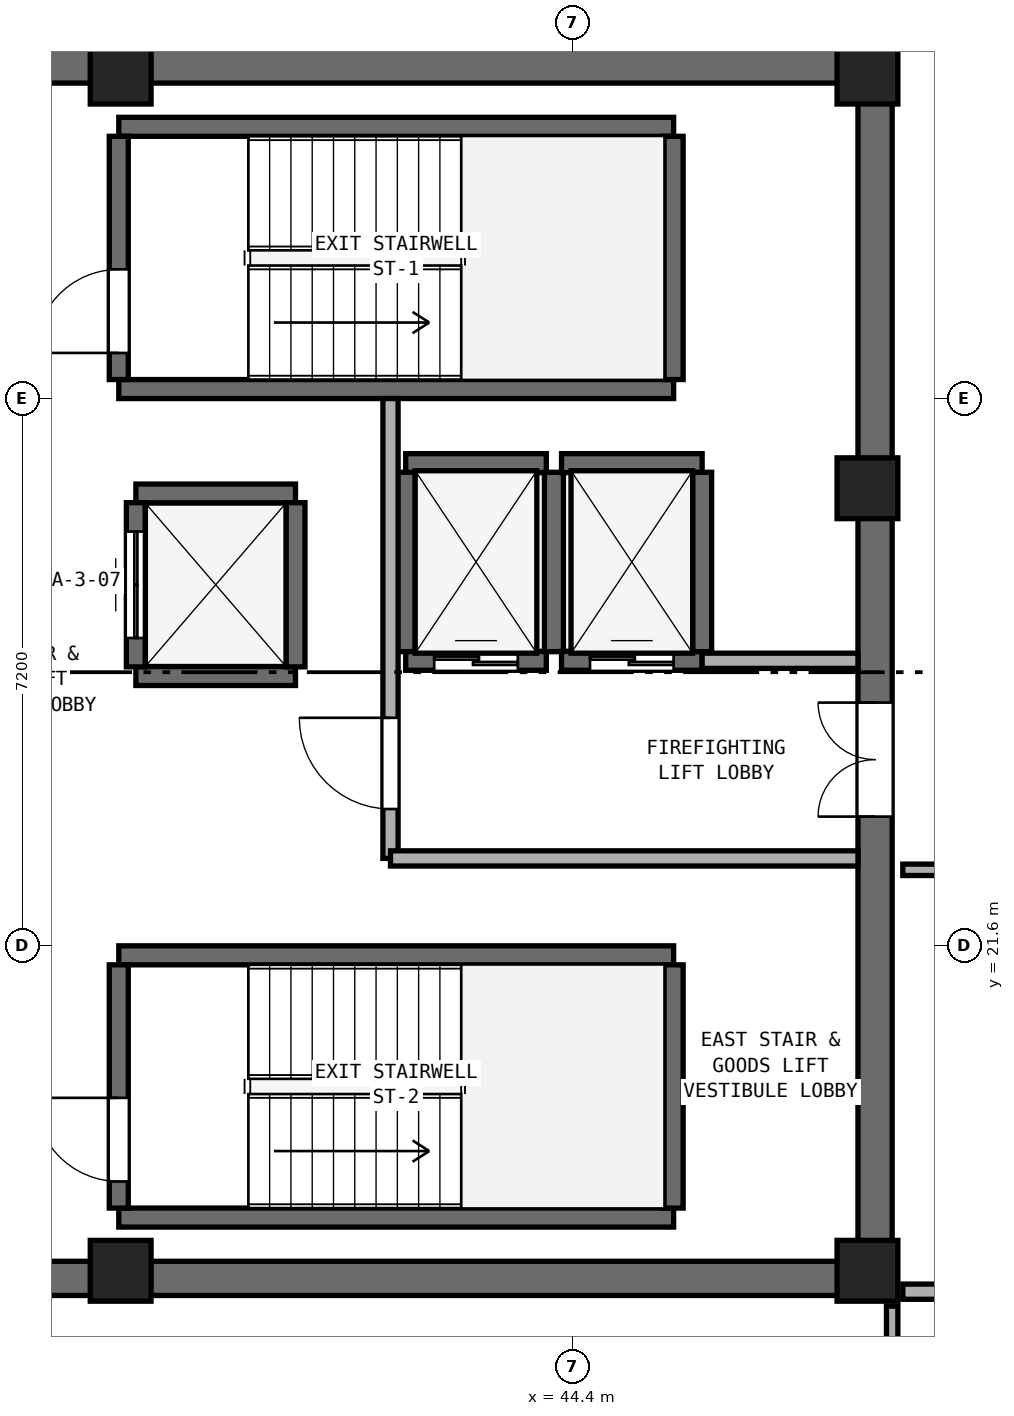
"""IFC4 building model, lengths in metres.
Left out: names, types, materials, properties, quantities, classifications, styles, units other than length and angle.
Written with IfcOpenShell. Run it as: python <this file> out.ifc"""

import sys

from ifc_helpers import new_model, si_unit, direction, frame, frame_2d, origin, origin_2d, place, context, subcontext, project, spatial, rectangle, extrude, element, fill, save


model = new_model("IFC4")
c1 = context("Model", 3, precision=1e-05, world=origin(), true_north=direction((0.0, 1.0)))
c2 = subcontext(c1, "Body", "Model", "MODEL_VIEW")
j1 = project(units=[si_unit("LENGTHUNIT", "METRE"), si_unit("PLANEANGLEUNIT", "RADIAN")], contexts=[c1])
p1 = place(None, origin())
s1 = spatial("IfcSite", under=j1, at=p1, CompositionType="ELEMENT")
p2 = place(p1, origin())
s2 = spatial("IfcBuilding", under=s1, at=p2, CompositionType="ELEMENT")
p3 = place(p2, frame((0.0, 0.0, 255.4)))
s3 = spatial("IfcBuildingStorey", under=s2, at=p3, CompositionType="ELEMENT", Elevation=255.4)
for number, where, z_axis, x_axis in (
    (1, (25.4, 17.225, 0.0), (0.0, 0.0, 1.0), (1.0, 0.0, 0.0)),
    (2, (25.4, 33.175, 0.0), (0.0, 0.0, 1.0), (1.0, 0.0, 0.0)),
):
    element("IfcWall", number, at=place(p3, frame(where, z_axis=z_axis, x_axis=x_axis)), inside=s3, PredefinedType="SHEAR", context=c2, shape_type="SweptSolid", body=[
        extrude(rectangle(XDim=23.2, YDim=0.45, at=frame_2d((11.6, 0.0))), origin(), (0.0, 0.0, 1.0), 3.51),
    ])
p4 = place(p3, frame((48.375, 17.45, 0.0), z_axis=(0.0, 0.0, 1.0), x_axis=(0.0, 1.0, 0.0)))
e3 = element("IfcWall", 3, at=p4, inside=s3, PredefinedType="SHEAR", context=c2, shape_type="SweptSolid", body=[
    extrude(rectangle(XDim=15.5, YDim=0.45, at=frame_2d((7.75, 0.0))), origin(), (0.0, 0.0, 1.0), 3.51),
])
p5 = place(p4, frame((5.85, 0.0, 0.0)))
e4 = element("IfcOpeningElement", 4, at=p5, cuts=e3, PredefinedType="OPENING", context=c2, shape_type="SweptSolid", body=[
    extrude(rectangle(XDim=1.5, YDim=2.15, at=frame_2d((0.75, 1.075))), frame((0.0, 0.235, 0.0), z_axis=(0.0, -1.0, 0.0), x_axis=(1.0, 0.0, 0.0)), (0.0, 0.0, 1.0), 0.47),
])
for number, where, z_axis, x_axis in (
    (5, (38.45, 17.325, 0.0), (0.0, 0.0, 1.0), (1.0, 0.0, 0.0)),
    (6, (48.275, 17.325, 0.0), (0.0, 0.0, 1.0), (1.0, 0.0, 0.0)),
    (7, (48.275, 27.62, 0.0), (0.0, 0.0, 1.0), (1.0, 0.0, 0.0)),
    (8, (48.275, 33.075, 0.0), (0.0, 0.0, 1.0), (1.0, 0.0, 0.0)),
    (9, (38.45, 33.075, 0.0), (0.0, 0.0, 1.0), (1.0, 0.0, 0.0)),
):
    element("IfcColumn", number, at=place(p3, frame(where, z_axis=z_axis, x_axis=x_axis)), inside=s3, PredefinedType="PILASTER", context=c2, shape_type="SweptSolid", body=[
        extrude(rectangle(XDim=0.8, YDim=0.8, at=origin_2d()), origin(), (0.0, 0.0, 1.0), 3.8),
    ])
for number, where, z_axis, x_axis in (
    (10, (38.425, 28.925, 0.0), (0.0, 0.0, 1.0), (1.0, 0.0, 0.0)),
    (11, (38.425, 32.375, 0.0), (0.0, 0.0, 1.0), (1.0, 0.0, 0.0)),
):
    element("IfcWall", number, at=place(p3, frame(where, z_axis=z_axis, x_axis=x_axis)), inside=s3, PredefinedType="SHEAR", context=c2, shape_type="SweptSolid", body=[
        extrude(rectangle(XDim=7.3, YDim=0.25, at=frame_2d((3.65, 0.0))), origin(), (0.0, 0.0, 1.0), 3.51),
    ])
p6 = place(p3, frame((38.425, 29.05, 0.0), z_axis=(0.0, 0.0, 1.0), x_axis=(0.0, 1.0, 0.0)))
e12 = element("IfcWall", 12, at=p6, inside=s3, PredefinedType="SHEAR", context=c2, shape_type="SweptSolid", body=[
    extrude(rectangle(XDim=3.2, YDim=0.25, at=frame_2d((1.6, 0.0))), origin(), (0.0, 0.0, 1.0), 3.51),
])
p7 = place(p6, frame((0.35, 0.0, 0.0)))
e13 = element("IfcOpeningElement", 13, at=p7, cuts=e12, PredefinedType="OPENING", context=c2, shape_type="SweptSolid", body=[
    extrude(rectangle(XDim=1.1, YDim=2.15, at=frame_2d((0.55, 1.075))), frame((0.0, 0.135, 0.0), z_axis=(0.0, -1.0, 0.0), x_axis=(1.0, 0.0, 0.0)), (0.0, 0.0, 1.0), 0.27),
])
p8 = place(p3, frame((45.725, 29.05, 0.0), z_axis=(0.0, 0.0, 1.0), x_axis=(0.0, 1.0, 0.0)))
e14 = element("IfcWall", 14, at=p8, inside=s3, PredefinedType="SHEAR", context=c2, shape_type="SweptSolid", body=[
    extrude(rectangle(XDim=3.2, YDim=0.25, at=frame_2d((1.6, 0.0))), origin(), (0.0, 0.0, 1.0), 3.51),
])
for number, where, z_axis, x_axis in (
    (15, (38.425, 18.025, 0.0), (0.0, 0.0, 1.0), (1.0, 0.0, 0.0)),
    (16, (38.425, 21.475, 0.0), (0.0, 0.0, 1.0), (1.0, 0.0, 0.0)),
):
    element("IfcWall", number, at=place(p3, frame(where, z_axis=z_axis, x_axis=x_axis)), inside=s3, PredefinedType="SHEAR", context=c2, shape_type="SweptSolid", body=[
        extrude(rectangle(XDim=7.3, YDim=0.25, at=frame_2d((3.65, 0.0))), origin(), (0.0, 0.0, 1.0), 3.51),
    ])
p9 = place(p3, frame((38.425, 18.15, 0.0), z_axis=(0.0, 0.0, 1.0), x_axis=(0.0, 1.0, 0.0)))
e17 = element("IfcWall", 17, at=p9, inside=s3, PredefinedType="SHEAR", context=c2, shape_type="SweptSolid", body=[
    extrude(rectangle(XDim=3.2, YDim=0.25, at=frame_2d((1.6, 0.0))), origin(), (0.0, 0.0, 1.0), 3.51),
])
p10 = place(p9, frame((0.35, 0.0, 0.0)))
e18 = element("IfcOpeningElement", 18, at=p10, cuts=e17, PredefinedType="OPENING", context=c2, shape_type="SweptSolid", body=[
    extrude(rectangle(XDim=1.1, YDim=2.15, at=frame_2d((0.55, 1.075))), frame((0.0, 0.135, 0.0), z_axis=(0.0, -1.0, 0.0), x_axis=(1.0, 0.0, 0.0)), (0.0, 0.0, 1.0), 0.27),
])
p11 = place(p3, frame((45.725, 18.15, 0.0), z_axis=(0.0, 0.0, 1.0), x_axis=(0.0, 1.0, 0.0)))
e19 = element("IfcWall", 19, at=p11, inside=s3, PredefinedType="SHEAR", context=c2, shape_type="SweptSolid", body=[
    extrude(rectangle(XDim=3.2, YDim=0.25, at=frame_2d((1.6, 0.0))), origin(), (0.0, 0.0, 1.0), 3.51),
])
p12 = place(p3, frame((42.2, 25.35, 0.0), z_axis=(0.0, 0.0, 1.0), x_axis=(1.0, 0.0, 0.0)))
e20 = element("IfcWall", 20, at=p12, inside=s3, PredefinedType="SHEAR", context=c2, shape_type="SweptSolid", body=[
    extrude(rectangle(XDim=1.85, YDim=0.25, at=frame_2d((0.925, 0.0))), origin(), (0.0, 0.0, 1.0), 3.51),
])
p13 = place(p12, frame((0.375, 0.0, 0.0)))
e21 = element("IfcOpeningElement", 21, at=p13, cuts=e20, PredefinedType="OPENING", context=c2, shape_type="SweptSolid", body=[
    extrude(rectangle(XDim=1.1, YDim=2.15, at=frame_2d((0.55, 1.075))), frame((0.0, 0.135, 0.0), z_axis=(0.0, -1.0, 0.0), x_axis=(1.0, 0.0, 0.0)), (0.0, 0.0, 1.0), 0.27),
])
p14 = place(p3, frame((42.2, 27.95, 0.0), z_axis=(0.0, 0.0, 1.0), x_axis=(1.0, 0.0, 0.0)))
e22 = element("IfcWall", 22, at=p14, inside=s3, PredefinedType="SHEAR", context=c2, shape_type="SweptSolid", body=[
    extrude(rectangle(XDim=1.85, YDim=0.25, at=frame_2d((0.925, 0.0))), origin(), (0.0, 0.0, 1.0), 3.51),
])
for number, where, z_axis, x_axis in (
    (23, (42.2, 25.47, 0.0), (0.0, 0.0, 1.0), (0.0, 1.0, 0.0)),
    (24, (44.15, 25.47, 0.0), (0.0, 0.0, 1.0), (0.0, 1.0, 0.0)),
):
    element("IfcWall", number, at=place(p3, frame(where, z_axis=z_axis, x_axis=x_axis)), inside=s3, PredefinedType="SHEAR", context=c2, shape_type="SweptSolid", body=[
        extrude(rectangle(XDim=2.36, YDim=0.25, at=frame_2d((1.18, 0.0))), origin(), (0.0, 0.0, 1.0), 3.51),
    ])
p15 = place(p3, frame((44.25, 25.35, 0.0), z_axis=(0.0, 0.0, 1.0), x_axis=(1.0, 0.0, 0.0)))
e25 = element("IfcWall", 25, at=p15, inside=s3, PredefinedType="SHEAR", context=c2, shape_type="SweptSolid", body=[
    extrude(rectangle(XDim=1.85, YDim=0.25, at=frame_2d((0.925, 0.0))), origin(), (0.0, 0.0, 1.0), 3.51),
])
p16 = place(p15, frame((0.375, 0.0, 0.0)))
e26 = element("IfcOpeningElement", 26, at=p16, cuts=e25, PredefinedType="OPENING", context=c2, shape_type="SweptSolid", body=[
    extrude(rectangle(XDim=1.1, YDim=2.15, at=frame_2d((0.55, 1.075))), frame((0.0, 0.135, 0.0), z_axis=(0.0, -1.0, 0.0), x_axis=(1.0, 0.0, 0.0)), (0.0, 0.0, 1.0), 0.27),
])
p17 = place(p3, frame((44.25, 27.95, 0.0), z_axis=(0.0, 0.0, 1.0), x_axis=(1.0, 0.0, 0.0)))
e27 = element("IfcWall", 27, at=p17, inside=s3, PredefinedType="SHEAR", context=c2, shape_type="SweptSolid", body=[
    extrude(rectangle(XDim=1.85, YDim=0.25, at=frame_2d((0.925, 0.0))), origin(), (0.0, 0.0, 1.0), 3.51),
])
p18 = place(p3, frame((46.1, 25.47, 0.0), z_axis=(0.0, 0.0, 1.0), x_axis=(0.0, 1.0, 0.0)))
e28 = element("IfcWall", 28, at=p18, inside=s3, PredefinedType="SHEAR", context=c2, shape_type="SweptSolid", body=[
    extrude(rectangle(XDim=2.36, YDim=0.25, at=frame_2d((1.18, 0.0))), origin(), (0.0, 0.0, 1.0), 3.51),
])
for number, where, z_axis, x_axis in (
    (29, (38.65, 25.15, 0.0), (0.0, 0.0, 1.0), (1.0, 0.0, 0.0)),
    (30, (38.65, 27.55, 0.0), (0.0, 0.0, 1.0), (1.0, 0.0, 0.0)),
):
    element("IfcWall", number, at=place(p3, frame(where, z_axis=z_axis, x_axis=x_axis)), inside=s3, PredefinedType="SHEAR", context=c2, shape_type="SweptSolid", body=[
        extrude(rectangle(XDim=2.1, YDim=0.25, at=frame_2d((1.05, 0.0))), origin(), (0.0, 0.0, 1.0), 3.51),
    ])
p19 = place(p3, frame((38.65, 25.27, 0.0), z_axis=(0.0, 0.0, 1.0), x_axis=(0.0, 1.0, 0.0)))
e31 = element("IfcWall", 31, at=p19, inside=s3, PredefinedType="SHEAR", context=c2, shape_type="SweptSolid", body=[
    extrude(rectangle(XDim=2.16, YDim=0.25, at=frame_2d((1.08, 0.0))), origin(), (0.0, 0.0, 1.0), 3.51),
])
p20 = place(p19, frame((0.38, 0.0, 0.0)))
e32 = element("IfcOpeningElement", 32, at=p20, cuts=e31, PredefinedType="OPENING", context=c2, shape_type="SweptSolid", body=[
    extrude(rectangle(XDim=1.4, YDim=2.2, at=frame_2d((0.7, 1.1))), frame((0.0, 0.135, 0.0), z_axis=(0.0, -1.0, 0.0), x_axis=(1.0, 0.0, 0.0)), (0.0, 0.0, 1.0), 0.27),
])
p21 = place(p3, frame((40.75, 25.27, 0.0), z_axis=(0.0, 0.0, 1.0), x_axis=(0.0, 1.0, 0.0)))
e33 = element("IfcWall", 33, at=p21, inside=s3, PredefinedType="SHEAR", context=c2, shape_type="SweptSolid", body=[
    extrude(rectangle(XDim=2.16, YDim=0.25, at=frame_2d((1.08, 0.0))), origin(), (0.0, 0.0, 1.0), 3.51),
])
p22 = place(p3, frame((42.0, 22.75, 0.0), z_axis=(0.0, 0.0, 1.0), x_axis=(0.0, 1.0, 0.0)))
e34 = element("IfcWall", 34, at=p22, inside=s3, PredefinedType="SOLIDWALL", context=c2, shape_type="SweptSolid", body=[
    extrude(rectangle(XDim=6.05, YDim=0.2, at=frame_2d((3.025, 0.0))), origin(), (0.0, 0.0, 1.0), 3.51),
])
p23 = place(p22, frame((0.65, 0.0, 0.0)))
e35 = element("IfcOpeningElement", 35, at=p23, cuts=e34, PredefinedType="OPENING", context=c2, shape_type="SweptSolid", body=[
    extrude(rectangle(XDim=1.2, YDim=2.15, at=frame_2d((0.6, 1.075))), frame((0.0, 0.11, 0.0), z_axis=(0.0, -1.0, 0.0), x_axis=(1.0, 0.0, 0.0)), (0.0, 0.0, 1.0), 0.22),
])
p24 = place(p3, frame((42.0, 22.75, 0.0), z_axis=(0.0, 0.0, 1.0), x_axis=(1.0, 0.0, 0.0)))
e36 = element("IfcWall", 36, at=p24, inside=s3, PredefinedType="SOLIDWALL", context=c2, shape_type="SweptSolid", body=[
    extrude(rectangle(XDim=6.15, YDim=0.2, at=frame_2d((3.075, 0.0))), origin(), (0.0, 0.0, 1.0), 3.51),
])
p25 = place(p3, frame((46.1, 25.35, 0.0), z_axis=(0.0, 0.0, 1.0), x_axis=(1.0, 0.0, 0.0)))
e37 = element("IfcWall", 37, at=p25, inside=s3, PredefinedType="SOLIDWALL", context=c2, shape_type="SweptSolid", body=[
    extrude(rectangle(XDim=2.05, YDim=0.2, at=frame_2d((1.025, 0.0))), origin(), (0.0, 0.0, 1.0), 3.51),
])
p26 = place(p3, frame((48.6, 15.2, 0.0), z_axis=(0.0, 0.0, 1.0), x_axis=(0.0, 1.0, 0.0)))
e38 = element("IfcWall", 38, at=p26, inside=s3, PredefinedType="PARTITIONING", context=c2, shape_type="SweptSolid", body=[
    extrude(rectangle(XDim=1.66, YDim=0.15, at=frame_2d((0.83, 0.0))), origin(), (0.0, 0.0, 1.0), 2.893),
])
p27 = place(p3, frame((48.74, 17.05, 0.0), z_axis=(0.0, 0.0, 1.0), x_axis=(1.0, 0.0, 0.0)))
e39 = element("IfcWall", 39, at=p27, inside=s3, PredefinedType="PARTITIONING", context=c2, shape_type="SweptSolid", body=[
    extrude(rectangle(XDim=16.555, YDim=0.2, at=frame_2d((8.277, 0.0))), origin(), (0.0, 0.0, 1.0), 2.893),
])
p28 = place(p3, frame((48.74, 22.6, 0.0), z_axis=(0.0, 0.0, 1.0), x_axis=(1.0, 0.0, 0.0)))
e40 = element("IfcWall", 40, at=p28, inside=s3, PredefinedType="PARTITIONING", context=c2, shape_type="SweptSolid", body=[
    extrude(rectangle(XDim=1.66, YDim=0.15, at=frame_2d((0.83, 0.0))), origin(), (0.0, 0.0, 1.0), 3.51),
])
p29 = place(p7, origin())
e41 = element("IfcDoor", 41, at=p29, inside=s3, OperationType="SINGLE_SWING_LEFT", PredefinedType="DOOR", context=c2, shape_type="SweptSolid", body=[
    extrude(rectangle(XDim=1.1, YDim=2.15, at=frame_2d((0.55, 1.075))), frame((0.0, 0.025, 0.0), z_axis=(0.0, -1.0, 0.0), x_axis=(1.0, 0.0, 0.0)), (0.0, 0.0, 1.0), 0.05),
])
fill(e13, e41)
p30 = place(p10, origin())
e42 = element("IfcDoor", 42, at=p30, inside=s3, OperationType="SINGLE_SWING_RIGHT", PredefinedType="DOOR", context=c2, shape_type="SweptSolid", body=[
    extrude(rectangle(XDim=1.1, YDim=2.15, at=frame_2d((0.55, 1.075))), frame((0.0, 0.025, 0.0), z_axis=(0.0, -1.0, 0.0), x_axis=(1.0, 0.0, 0.0)), (0.0, 0.0, 1.0), 0.05),
])
fill(e18, e42)
p31 = place(p13, origin())
e43 = element("IfcDoor", 43, at=p31, inside=s3, OperationType="DOUBLE_DOOR_SLIDING", PredefinedType="DOOR", context=c2, shape_type="SweptSolid", body=[
    extrude(rectangle(XDim=1.1, YDim=2.15, at=frame_2d((0.55, 1.075))), frame((0.0, 0.025, 0.0), z_axis=(0.0, -1.0, 0.0), x_axis=(1.0, 0.0, 0.0)), (0.0, 0.0, 1.0), 0.05),
])
fill(e21, e43)
p32 = place(p16, origin())
e44 = element("IfcDoor", 44, at=p32, inside=s3, OperationType="DOUBLE_DOOR_SLIDING", PredefinedType="DOOR", context=c2, shape_type="SweptSolid", body=[
    extrude(rectangle(XDim=1.1, YDim=2.15, at=frame_2d((0.55, 1.075))), frame((0.0, 0.025, 0.0), z_axis=(0.0, -1.0, 0.0), x_axis=(1.0, 0.0, 0.0)), (0.0, 0.0, 1.0), 0.05),
])
fill(e26, e44)
p33 = place(p20, origin())
e45 = element("IfcDoor", 45, at=p33, inside=s3, OperationType="DOUBLE_DOOR_SLIDING", PredefinedType="DOOR", context=c2, shape_type="SweptSolid", body=[
    extrude(rectangle(XDim=1.4, YDim=2.2, at=frame_2d((0.7, 1.1))), frame((0.0, 0.025, 0.0), z_axis=(0.0, -1.0, 0.0), x_axis=(1.0, 0.0, 0.0)), (0.0, 0.0, 1.0), 0.05),
])
fill(e32, e45)
p34 = place(p23, origin())
e46 = element("IfcDoor", 46, at=p34, inside=s3, OperationType="SINGLE_SWING_RIGHT", PredefinedType="DOOR", context=c2, shape_type="SweptSolid", body=[
    extrude(rectangle(XDim=1.2, YDim=2.15, at=frame_2d((0.6, 1.075))), frame((0.0, 0.025, 0.0), z_axis=(0.0, -1.0, 0.0), x_axis=(1.0, 0.0, 0.0)), (0.0, 0.0, 1.0), 0.05),
])
fill(e35, e46)
p35 = place(p5, origin())
e47 = element("IfcDoor", 47, at=p35, inside=s3, OperationType="DOUBLE_DOOR_SINGLE_SWING", PredefinedType="DOOR", context=c2, shape_type="SweptSolid", body=[
    extrude(rectangle(XDim=1.5, YDim=2.15, at=frame_2d((0.75, 1.075))), frame((0.0, 0.025, 0.0), z_axis=(0.0, -1.0, 0.0), x_axis=(1.0, 0.0, 0.0)), (0.0, 0.0, 1.0), 0.05),
])
fill(e4, e47)
save(model, sys.argv[1])
